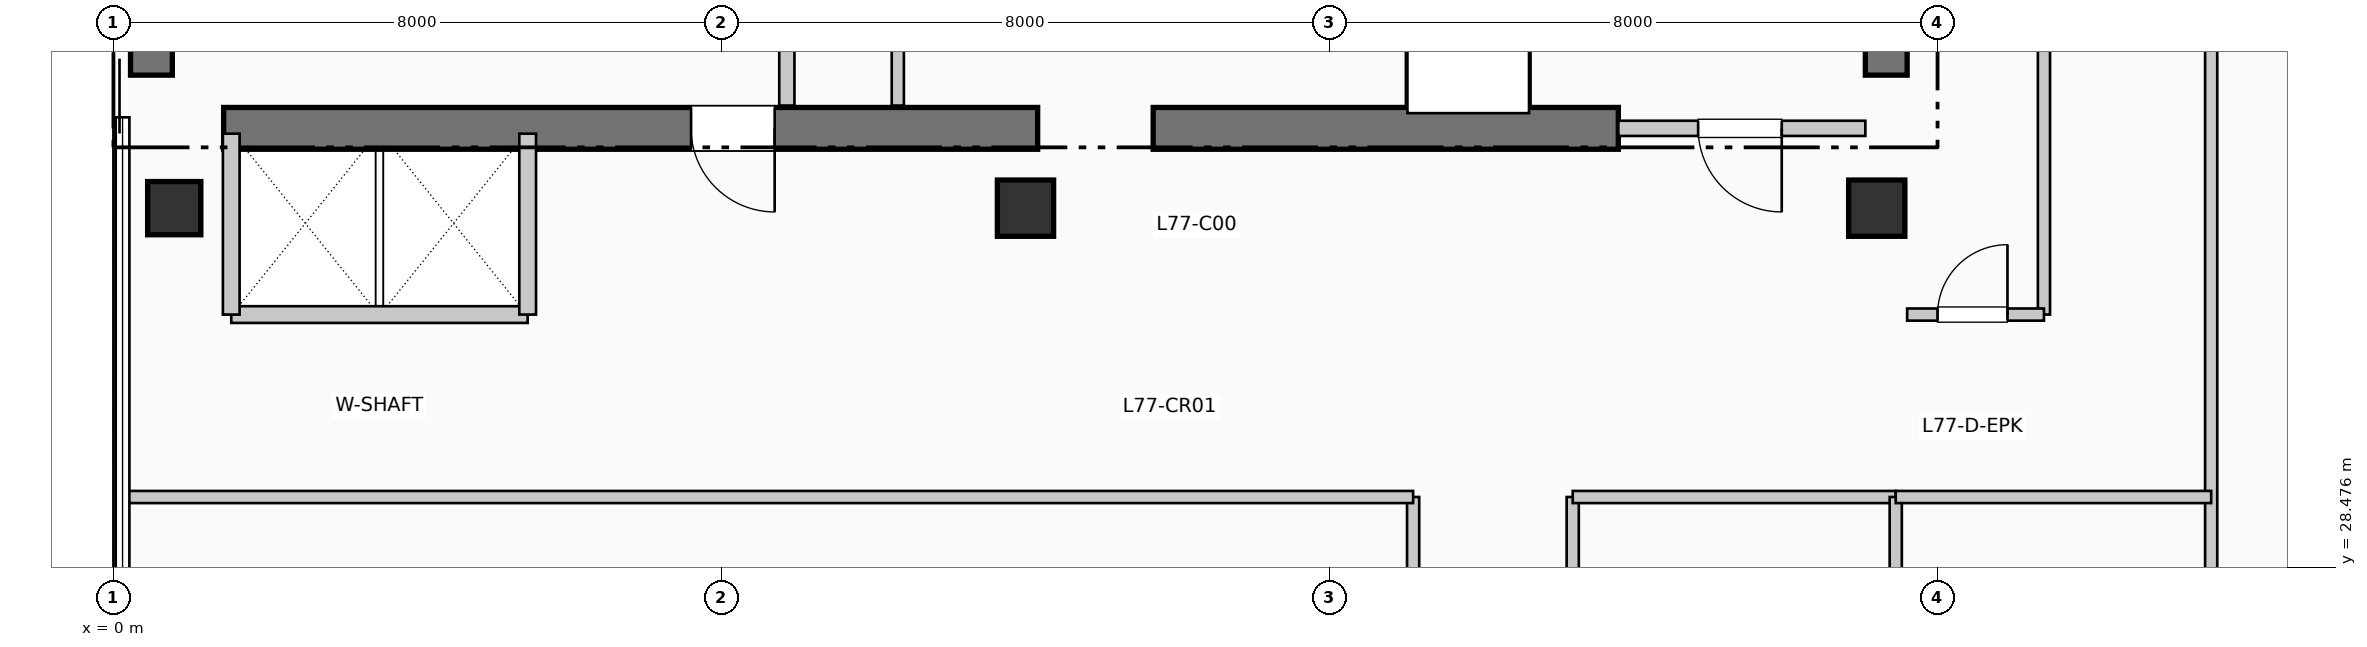
"""IFC4 building model, lengths in metres.
Left out: names, types, materials, properties, quantities, classifications, styles, units other than length and angle.
Written with IfcOpenShell. Run it as: python <this file> out.ifc"""

import sys

from ifc_helpers import new_model, si_unit, direction, frame, frame_2d, origin, origin_2d, place, context, subcontext, project, spatial, rectangle, extrude, element, fill, save


model = new_model("IFC4")
c1 = context("Model", 3, precision=1e-05, world=origin(), true_north=direction((0.0, 1.0)))
c2 = subcontext(c1, "Body", "Model", "MODEL_VIEW")
j1 = project(units=[si_unit("LENGTHUNIT", "METRE"), si_unit("PLANEANGLEUNIT", "RADIAN")], contexts=[c1])
p1 = place(None, origin())
s1 = spatial("IfcSite", under=j1, at=p1, CompositionType="ELEMENT")
p2 = place(p1, origin())
s2 = spatial("IfcBuilding", under=s1, at=p2, CompositionType="ELEMENT")
p3 = place(p2, frame((0.0, 0.0, 315.81)))
s3 = spatial("IfcBuildingStorey", under=s2, at=p3, CompositionType="ELEMENT", Elevation=315.81)
p4 = place(p3, frame((0.5, 34.95, 0.0), z_axis=(0.0, 0.0, 1.0), x_axis=(0.0, 1.0, 0.0)))
e1 = element("IfcWall", 1, at=p4, inside=s3, PredefinedType="SHEAR", context=c2, shape_type="SweptSolid", body=[
    extrude(rectangle(XDim=7.9, YDim=0.55, at=frame_2d((3.95, 0.0))), origin(), (0.0, 0.0, 1.0), 3.96),
])
p5 = place(p3, frame((23.325, 34.95, 0.0), z_axis=(0.0, 0.0, 1.0), x_axis=(0.0, 1.0, 0.0)))
e2 = element("IfcWall", 2, at=p5, inside=s3, PredefinedType="SHEAR", context=c2, shape_type="SweptSolid", body=[
    extrude(rectangle(XDim=10.64, YDim=0.55, at=frame_2d((5.32, 0.0))), origin(), (0.0, 0.0, 1.0), 3.96),
])
p6 = place(p3, frame((1.45, 34.25, 0.0), z_axis=(0.0, 0.0, 1.0), x_axis=(1.0, 0.0, 0.0)))
e3 = element("IfcWall", 3, at=p6, inside=s3, PredefinedType="SHEAR", context=c2, shape_type="SweptSolid", body=[
    extrude(rectangle(XDim=10.71, YDim=0.55, at=frame_2d((5.355, 0.0))), origin(), (0.0, 0.0, 1.0), 3.96),
])
p7 = place(p6, frame((7.25, 0.0, 0.0), z_axis=(0.0, 0.0, 1.0), x_axis=(-1.0, 0.0, 0.0)))
e4 = element("IfcOpeningElement", 4, at=p7, cuts=e3, PredefinedType="OPENING", context=c2, shape_type="SweptSolid", body=[
    extrude(rectangle(XDim=1.1, YDim=2.15, at=frame_2d((0.55, 1.075))), frame((0.0, 0.285, 0.0), z_axis=(0.0, -1.0, 0.0), x_axis=(1.0, 0.0, 0.0)), (0.0, 0.0, 1.0), 0.57),
])
p8 = place(p3, frame((13.68, 34.25, 0.0), z_axis=(0.0, 0.0, 1.0), x_axis=(1.0, 0.0, 0.0)))
e5 = element("IfcWall", 5, at=p8, inside=s3, PredefinedType="SHEAR", context=c2, shape_type="SweptSolid", body=[
    extrude(rectangle(XDim=6.12, YDim=0.55, at=frame_2d((3.06, 0.0))), origin(), (0.0, 0.0, 1.0), 3.96),
])
p9 = place(p3, frame((0.8, 33.2, 0.0), z_axis=(0.0, 0.0, 1.0), x_axis=(1.0, 0.0, 0.0)))
e6 = element("IfcColumn", 6, at=p9, inside=s3, PredefinedType="COLUMN", context=c2, shape_type="SweptSolid", body=[
    extrude(rectangle(XDim=0.7, YDim=0.7, at=origin_2d()), origin(), (0.0, 0.0, 1.0), 3.96),
])
for number, where, z_axis, x_axis in (
    (7, (12.0, 33.2, 0.0), (0.0, 0.0, 1.0), (1.0, 0.0, 0.0)),
    (8, (23.2, 33.2, 0.0), (0.0, 0.0, 1.0), (1.0, 0.0, 0.0)),
):
    element("IfcColumn", number, at=place(p3, frame(where, z_axis=z_axis, x_axis=x_axis)), inside=s3, PredefinedType="COLUMN", context=c2, shape_type="SweptSolid", body=[
        extrude(rectangle(XDim=0.74, YDim=0.74, at=origin_2d()), origin(), (0.0, 0.0, 1.0), 3.96),
    ])
p10 = place(p3, frame((8.86, 34.55, 0.0), z_axis=(0.0, 0.0, 1.0), x_axis=(0.0, 1.0, 0.0)))
e9 = element("IfcWall", 9, at=p10, inside=s3, PredefinedType="PARTITIONING", context=c2, shape_type="SweptSolid", body=[
    extrude(rectangle(XDim=2.5, YDim=0.2, at=frame_2d((1.25, 0.0))), origin(), (0.0, 0.0, 1.0), 3.74),
])
p11 = place(p3, frame((19.8, 34.25, 0.0), z_axis=(0.0, 0.0, 1.0), x_axis=(1.0, 0.0, 0.0)))
e10 = element("IfcWall", 10, at=p11, inside=s3, PredefinedType="PARTITIONING", context=c2, shape_type="SweptSolid", body=[
    extrude(rectangle(XDim=3.25, YDim=0.2, at=frame_2d((1.625, 0.0))), origin(), (0.0, 0.0, 1.0), 3.74),
])
p12 = place(p11, frame((2.15, 0.0, 0.0), z_axis=(0.0, 0.0, 1.0), x_axis=(-1.0, 0.0, 0.0)))
e11 = element("IfcOpeningElement", 11, at=p12, cuts=e10, PredefinedType="OPENING", context=c2, shape_type="SweptSolid", body=[
    extrude(rectangle(XDim=1.1, YDim=2.15, at=frame_2d((0.55, 1.075))), frame((0.0, 0.11, 0.0), z_axis=(0.0, -1.0, 0.0), x_axis=(1.0, 0.0, 0.0)), (0.0, 0.0, 1.0), 0.22),
])
p13 = place(p3, frame((1.55, 31.8, 0.0), z_axis=(0.0, 0.0, 1.0), x_axis=(1.0, 0.0, 0.0)))
e12 = element("IfcWall", 12, at=p13, inside=s3, PredefinedType="PARTITIONING", context=c2, shape_type="SweptSolid", body=[
    extrude(rectangle(XDim=3.9, YDim=0.22, at=frame_2d((1.95, 0.0))), origin(), (0.0, 0.0, 1.0), 3.74),
])
for number, where, z_axis, x_axis in (
    (13, (1.55, 31.8, 0.0), (0.0, 0.0, 1.0), (0.0, 1.0, 0.0)),
    (14, (5.45, 31.8, 0.0), (0.0, 0.0, 1.0), (0.0, 1.0, 0.0)),
):
    element("IfcWall", number, at=place(p3, frame(where, z_axis=z_axis, x_axis=x_axis)), inside=s3, PredefinedType="PARTITIONING", context=c2, shape_type="SweptSolid", body=[
        extrude(rectangle(XDim=2.38, YDim=0.22, at=frame_2d((1.19, 0.0))), origin(), (0.0, 0.0, 1.0), 3.74),
    ])
p14 = place(p3, frame((10.32, 34.55, 0.0), z_axis=(0.0, 0.0, 1.0), x_axis=(0.0, 1.0, 0.0)))
e15 = element("IfcWall", 15, at=p14, inside=s3, PredefinedType="PARTITIONING", context=c2, shape_type="SweptSolid", body=[
    extrude(rectangle(XDim=2.15, YDim=0.16, at=frame_2d((1.075, 0.0))), origin(), (0.0, 0.0, 1.0), 3.74),
])
p15 = place(p3, frame((17.1, 10.19, 0.0), z_axis=(0.0, 0.0, 1.0), x_axis=(0.0, 1.0, 0.0)))
e16 = element("IfcWall", 16, at=p15, inside=s3, PredefinedType="PARTITIONING", context=c2, shape_type="SweptSolid", body=[
    extrude(rectangle(XDim=19.21, YDim=0.16, at=frame_2d((9.605, 0.0))), origin(), (0.0, 0.0, 1.0), 3.74),
])
p16 = place(p15, frame((2.396, 0.0, 0.0), z_axis=(0.0, 0.0, 1.0), x_axis=(-1.0, 0.0, 0.0)))
e17 = element("IfcOpeningElement", 17, at=p16, cuts=e16, PredefinedType="OPENING", context=c2, shape_type="SweptSolid", body=[
    extrude(rectangle(XDim=0.95, YDim=2.15, at=frame_2d((0.475, 1.075))), frame((0.0, 0.09, 0.0), z_axis=(0.0, -1.0, 0.0), x_axis=(1.0, 0.0, 0.0)), (0.0, 0.0, 1.0), 0.18),
])
p17 = place(p15, frame((6.43, 0.0, 0.0), z_axis=(0.0, 0.0, 1.0), x_axis=(-1.0, 0.0, 0.0)))
e18 = element("IfcOpeningElement", 18, at=p17, cuts=e16, PredefinedType="OPENING", context=c2, shape_type="SweptSolid", body=[
    extrude(rectangle(XDim=0.95, YDim=2.15, at=frame_2d((0.475, 1.075))), frame((0.0, 0.09, 0.0), z_axis=(0.0, -1.0, 0.0), x_axis=(1.0, 0.0, 0.0)), (0.0, 0.0, 1.0), 0.18),
])
p18 = place(p15, frame((10.752, 0.0, 0.0), z_axis=(0.0, 0.0, 1.0), x_axis=(-1.0, 0.0, 0.0)))
e19 = element("IfcOpeningElement", 19, at=p18, cuts=e16, PredefinedType="OPENING", context=c2, shape_type="SweptSolid", body=[
    extrude(rectangle(XDim=0.95, YDim=2.15, at=frame_2d((0.475, 1.075))), frame((0.0, 0.09, 0.0), z_axis=(0.0, -1.0, 0.0), x_axis=(1.0, 0.0, 0.0)), (0.0, 0.0, 1.0), 0.18),
])
p19 = place(p15, frame((14.786, 0.0, 0.0), z_axis=(0.0, 0.0, 1.0), x_axis=(-1.0, 0.0, 0.0)))
e20 = element("IfcOpeningElement", 20, at=p19, cuts=e16, PredefinedType="OPENING", context=c2, shape_type="SweptSolid", body=[
    extrude(rectangle(XDim=0.95, YDim=2.15, at=frame_2d((0.475, 1.075))), frame((0.0, 0.09, 0.0), z_axis=(0.0, -1.0, 0.0), x_axis=(1.0, 0.0, 0.0)), (0.0, 0.0, 1.0), 0.18),
])
p20 = place(p15, frame((18.148, 0.0, 0.0), z_axis=(0.0, 0.0, 1.0), x_axis=(-1.0, 0.0, 0.0)))
e21 = element("IfcOpeningElement", 21, at=p20, cuts=e16, PredefinedType="OPENING", context=c2, shape_type="SweptSolid", body=[
    extrude(rectangle(XDim=0.95, YDim=2.15, at=frame_2d((0.475, 1.075))), frame((0.0, 0.09, 0.0), z_axis=(0.0, -1.0, 0.0), x_axis=(1.0, 0.0, 0.0)), (0.0, 0.0, 1.0), 0.18),
])
p21 = place(p3, frame((19.2, 10.19, 0.0), z_axis=(0.0, 0.0, 1.0), x_axis=(0.0, 1.0, 0.0)))
e22 = element("IfcWall", 22, at=p21, inside=s3, PredefinedType="PARTITIONING", context=c2, shape_type="SweptSolid", body=[
    extrude(rectangle(XDim=19.21, YDim=0.16, at=frame_2d((9.605, 0.0))), origin(), (0.0, 0.0, 1.0), 3.74),
])
p22 = place(p21, frame((9.13, 0.0, 0.0)))
e23 = element("IfcOpeningElement", 23, at=p22, cuts=e22, PredefinedType="OPENING", context=c2, shape_type="SweptSolid", body=[
    extrude(rectangle(XDim=0.95, YDim=2.15, at=frame_2d((0.475, 1.075))), frame((0.0, 0.09, 0.0), z_axis=(0.0, -1.0, 0.0), x_axis=(1.0, 0.0, 0.0)), (0.0, 0.0, 1.0), 0.18),
])
p23 = place(p3, frame((0.19, 29.4, 0.0), z_axis=(0.0, 0.0, 1.0), x_axis=(1.0, 0.0, 0.0)))
e24 = element("IfcWall", 24, at=p23, inside=s3, PredefinedType="PARTITIONING", context=c2, shape_type="SweptSolid", body=[
    extrude(rectangle(XDim=16.91, YDim=0.16, at=frame_2d((8.455, 0.0))), origin(), (0.0, 0.0, 1.0), 3.425),
])
p24 = place(p3, frame((19.2, 29.4, 0.0), z_axis=(0.0, 0.0, 1.0), x_axis=(1.0, 0.0, 0.0)))
e25 = element("IfcWall", 25, at=p24, inside=s3, PredefinedType="PARTITIONING", context=c2, shape_type="SweptSolid", body=[
    extrude(rectangle(XDim=4.25, YDim=0.16, at=frame_2d((2.125, 0.0))), origin(), (0.0, 0.0, 1.0), 3.425),
])
p25 = place(p3, frame((23.45, 5.99, 0.0), z_axis=(0.0, 0.0, 1.0), x_axis=(0.0, 1.0, 0.0)))
e26 = element("IfcWall", 26, at=p25, inside=s3, PredefinedType="PARTITIONING", context=c2, shape_type="SweptSolid", body=[
    extrude(rectangle(XDim=23.41, YDim=0.16, at=frame_2d((11.705, 0.0))), origin(), (0.0, 0.0, 1.0), 3.175),
])
p26 = place(p3, frame((25.4, 31.8, 0.0), z_axis=(0.0, 0.0, 1.0), x_axis=(0.0, 1.0, 0.0)))
e27 = element("IfcWall", 27, at=p26, inside=s3, PredefinedType="PARTITIONING", context=c2, shape_type="SweptSolid", body=[
    extrude(rectangle(XDim=14.01, YDim=0.16, at=frame_2d((7.005, 0.0))), origin(), (0.0, 0.0, 1.0), 3.74),
])
p27 = place(p3, frame((27.6, 25.19, 0.0), z_axis=(0.0, 0.0, 1.0), x_axis=(0.0, 1.0, 0.0)))
e28 = element("IfcWall", 28, at=p27, inside=s3, PredefinedType="PARTITIONING", context=c2, shape_type="SweptSolid", body=[
    extrude(rectangle(XDim=12.01, YDim=0.16, at=frame_2d((6.005, 0.0))), origin(), (0.0, 0.0, 1.0), 3.74),
])
p28 = place(p27, frame((2.15, 0.0, 0.0), z_axis=(0.0, 0.0, 1.0), x_axis=(-1.0, 0.0, 0.0)))
e29 = element("IfcOpeningElement", 29, at=p28, cuts=e28, PredefinedType="OPENING", context=c2, shape_type="SweptSolid", body=[
    extrude(rectangle(XDim=0.95, YDim=2.15, at=frame_2d((0.475, 1.075))), frame((0.0, 0.09, 0.0), z_axis=(0.0, -1.0, 0.0), x_axis=(1.0, 0.0, 0.0)), (0.0, 0.0, 1.0), 0.18),
])
p29 = place(p3, frame((23.45, 29.4, 0.0), z_axis=(0.0, 0.0, 1.0), x_axis=(1.0, 0.0, 0.0)))
e30 = element("IfcWall", 30, at=p29, inside=s3, PredefinedType="PARTITIONING", context=c2, shape_type="SweptSolid", body=[
    extrude(rectangle(XDim=4.15, YDim=0.16, at=frame_2d((2.075, 0.0))), origin(), (0.0, 0.0, 1.0), 3.425),
])
p30 = place(p3, frame((23.6, 31.8, 0.0), z_axis=(0.0, 0.0, 1.0), x_axis=(1.0, 0.0, 0.0)))
e31 = element("IfcWall", 31, at=p30, inside=s3, PredefinedType="PARTITIONING", context=c2, shape_type="SweptSolid", body=[
    extrude(rectangle(XDim=1.8, YDim=0.16, at=frame_2d((0.9, 0.0))), origin(), (0.0, 0.0, 1.0), 3.74),
])
p31 = place(p30, frame((0.4, 0.0, 0.0)))
e32 = element("IfcOpeningElement", 32, at=p31, cuts=e31, PredefinedType="OPENING", context=c2, shape_type="SweptSolid", body=[
    extrude(rectangle(XDim=0.92, YDim=2.1, at=frame_2d((0.46, 1.05))), frame((0.0, 0.09, 0.0), z_axis=(0.0, -1.0, 0.0), x_axis=(1.0, 0.0, 0.0)), (0.0, 0.0, 1.0), 0.18),
])
p32 = place(p7, origin())
e33 = element("IfcDoor", 33, at=p32, inside=s3, OperationType="SINGLE_SWING_RIGHT", PredefinedType="DOOR", context=c2, shape_type="SweptSolid", body=[
    extrude(rectangle(XDim=1.1, YDim=2.15, at=frame_2d((0.55, 1.075))), frame((0.0, 0.025, 0.0), z_axis=(0.0, -1.0, 0.0), x_axis=(1.0, 0.0, 0.0)), (0.0, 0.0, 1.0), 0.05),
])
fill(e4, e33)
p33 = place(p12, origin())
e34 = element("IfcDoor", 34, at=p33, inside=s3, OperationType="SINGLE_SWING_RIGHT", PredefinedType="DOOR", context=c2, shape_type="SweptSolid", body=[
    extrude(rectangle(XDim=1.1, YDim=2.15, at=frame_2d((0.55, 1.075))), frame((0.0, 0.025, 0.0), z_axis=(0.0, -1.0, 0.0), x_axis=(1.0, 0.0, 0.0)), (0.0, 0.0, 1.0), 0.05),
])
fill(e11, e34)
p34 = place(p31, origin())
e35 = element("IfcDoor", 35, at=p34, inside=s3, OperationType="SINGLE_SWING_RIGHT", PredefinedType="DOOR", context=c2, shape_type="SweptSolid", body=[
    extrude(rectangle(XDim=0.92, YDim=2.1, at=frame_2d((0.46, 1.05))), frame((0.0, 0.025, 0.0), z_axis=(0.0, -1.0, 0.0), x_axis=(1.0, 0.0, 0.0)), (0.0, 0.0, 1.0), 0.05),
])
fill(e32, e35)
save(model, sys.argv[1])
